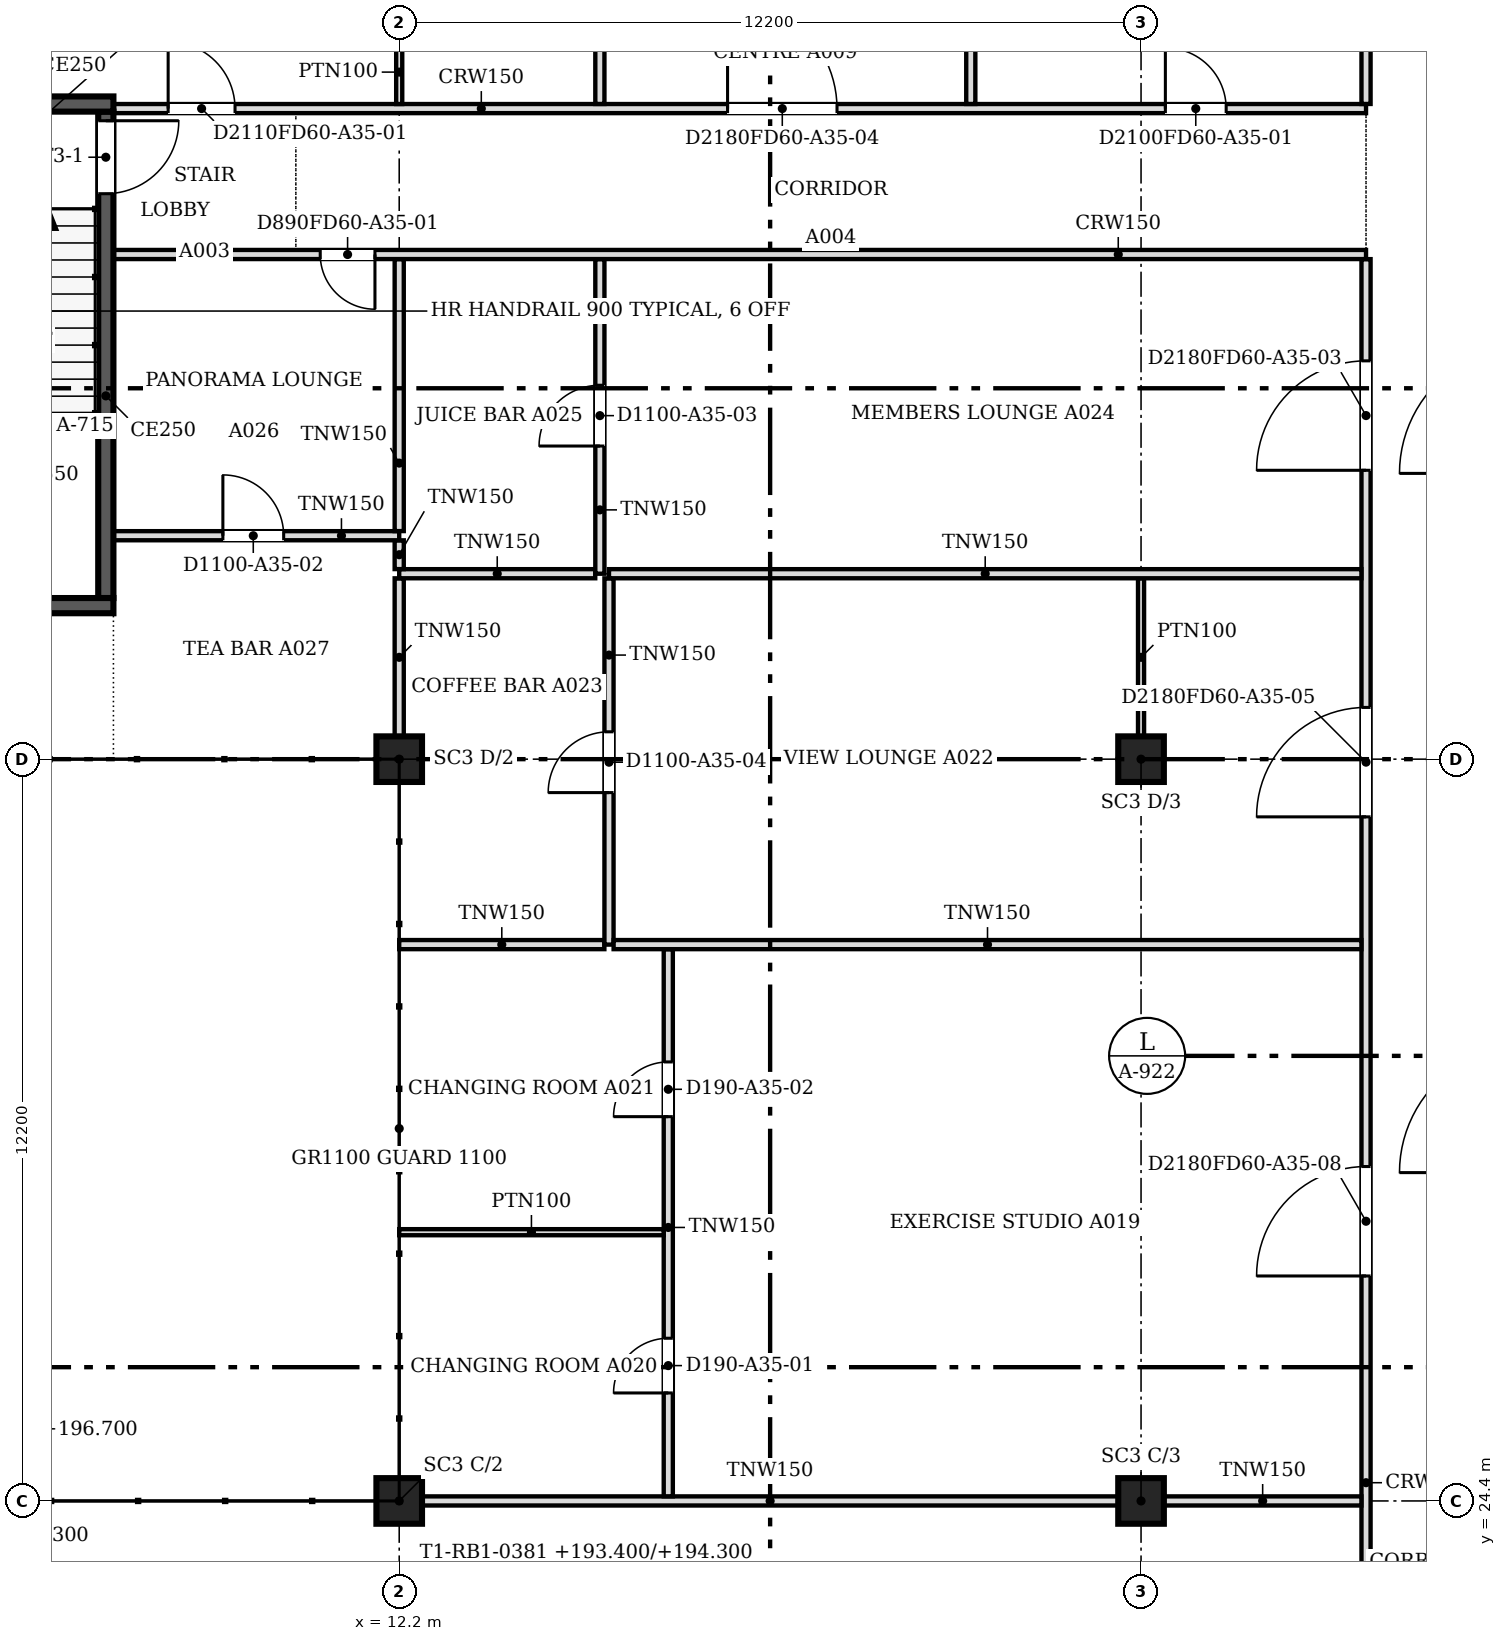
"""IFC4 building model, lengths in metres.
Left out: names, types, materials, properties, quantities, classifications, styles, units other than length and angle.
Written with IfcOpenShell. Run it as: python <this file> out.ifc"""

import sys

from ifc_helpers import new_model, si_unit, direction, frame, frame_2d, origin, origin_2d, place, context, subcontext, project, spatial, rectangle, extrude, source, transform, mapped, element, fill, save


model = new_model("IFC4")
c1 = context("Model", 3, precision=1e-05, world=origin(), true_north=direction((0.0, 1.0)))
c2 = subcontext(c1, "Body", "Model", "MODEL_VIEW")
j1 = project(units=[si_unit("LENGTHUNIT", "METRE"), si_unit("PLANEANGLEUNIT", "RADIAN")], contexts=[c1])
p1 = place(None, origin())
s1 = spatial("IfcSite", under=j1, at=p1, CompositionType="ELEMENT")
p2 = place(p1, origin())
s2 = spatial("IfcBuilding", under=s1, at=p2, CompositionType="ELEMENT")
p3 = place(p2, frame((0.0, 0.0, 193.4)))
s3 = spatial("IfcBuildingStorey", under=s2, at=p3, CompositionType="ELEMENT", Elevation=193.4)
for number, where, z_axis, x_axis in (
    (1, (12.2, 24.4, 0.0), (0.0, 0.0, 1.0), (1.0, 0.0, 0.0)),
    (2, (12.2, 36.6, 0.0), (0.0, 0.0, 1.0), (1.0, 0.0, 0.0)),
    (3, (24.4, 24.4, 0.0), (0.0, 0.0, 1.0), (1.0, 0.0, 0.0)),
    (4, (24.4, 36.6, 0.0), (0.0, 0.0, 1.0), (1.0, 0.0, 0.0)),
):
    element("IfcColumn", number, at=place(p3, frame(where, z_axis=z_axis, x_axis=x_axis)), inside=s3, PredefinedType="COLUMN", context=c2, shape_type="SweptSolid", body=[
        extrude(rectangle(XDim=0.75, YDim=0.75, at=origin_2d()), origin(), (0.0, 0.0, 1.0), 4.3),
    ])
for number, where, z_axis, x_axis in (
    (5, (7.5, 39.125, 0.0), (0.0, 0.0, 1.0), (-1.0, 0.0, 0.0)),
    (6, (3.6, 47.375, 0.0), (0.0, 0.0, 1.0), (1.0, 0.0, 0.0)),
):
    element("IfcWall", number, at=place(p3, frame(where, z_axis=z_axis, x_axis=x_axis)), inside=s3, PredefinedType="SOLIDWALL", context=c2, shape_type="SweptSolid", body=[
        extrude(rectangle(XDim=3.9, YDim=0.25, at=frame_2d((1.95, 0.0))), origin(), (0.0, 0.0, 1.0), 4.5),
    ])
p4 = place(p3, frame((7.375, 47.25, 0.0), z_axis=(0.0, 0.0, 1.0), x_axis=(0.0, -1.0, 0.0)))
e7 = element("IfcWall", 7, at=p4, inside=s3, PredefinedType="SOLIDWALL", context=c2, shape_type="SweptSolid", body=[
    extrude(rectangle(XDim=8.0, YDim=0.25, at=frame_2d((4.0, 0.0))), origin(), (0.0, 0.0, 1.0), 4.5),
])
m1 = source(origin(), c2, "Body", "SweptSolid", [
    extrude(rectangle(XDim=1.2, YDim=2.1, at=frame_2d((0.6, 1.05))), frame((0.0, 0.135, 0.0), z_axis=(0.0, -1.0, 0.0), x_axis=(1.0, 0.0, 0.0)), (0.0, 0.0, 1.0), 0.27),
])
p5 = place(p4, frame((0.15, 0.0, 0.0)))
e8 = element("IfcOpeningElement", 8, at=p5, cuts=e7, PredefinedType="OPENING", context=c2, shape_type="MappedRepresentation", body=[
    mapped(m1, transform((0.0, 0.0, 0.0), scale=1.0)),
])
p6 = place(p3, frame((28.1, 18.8, 0.0), z_axis=(0.0, 0.0, 1.0), x_axis=(0.0, 1.0, 0.0)))
e9 = element("IfcWall", 9, at=p6, inside=s3, PredefinedType="PARTITIONING", context=c2, shape_type="SweptSolid", body=[
    extrude(rectangle(XDim=26.024, YDim=0.15, at=frame_2d((13.012, 0.0))), origin(), (0.0, 0.0, 1.0), 3.767),
])
m2 = source(origin(), c2, "Body", "SweptSolid", [
    extrude(rectangle(XDim=1.8, YDim=2.1, at=frame_2d((0.9, 1.05))), frame((0.0, 0.085, 0.0), z_axis=(0.0, -1.0, 0.0), x_axis=(1.0, 0.0, 0.0)), (0.0, 0.0, 1.0), 0.17),
])
p7 = place(p6, frame((0.7, 0.0, 0.0)))
e10 = element("IfcOpeningElement", 10, at=p7, cuts=e9, PredefinedType="OPENING", context=c2, shape_type="MappedRepresentation", body=[
    mapped(m2, transform((0.0, 0.0, 0.0), scale=1.0)),
])
p8 = place(p6, frame((22.551, 0.0, 0.0)))
e11 = element("IfcOpeningElement", 11, at=p8, cuts=e9, PredefinedType="OPENING", context=c2, shape_type="MappedRepresentation", body=[
    mapped(m2, transform((0.0, 0.0, 0.0), scale=1.0)),
])
p9 = place(p6, frame((16.851, 0.0, 0.0)))
e12 = element("IfcOpeningElement", 12, at=p9, cuts=e9, PredefinedType="OPENING", context=c2, shape_type="MappedRepresentation", body=[
    mapped(m2, transform((0.0, 0.0, 0.0), scale=1.0)),
])
p10 = place(p6, frame((9.3, 0.0, 0.0)))
e13 = element("IfcOpeningElement", 13, at=p10, cuts=e9, PredefinedType="OPENING", context=c2, shape_type="MappedRepresentation", body=[
    mapped(m2, transform((0.0, 0.0, 0.0), scale=1.0)),
])
p11 = place(p3, frame((12.576, 24.4, 0.0), z_axis=(0.0, 0.0, 1.0), x_axis=(1.0, 0.0, 0.0)))
e14 = element("IfcWall", 14, at=p11, inside=s3, PredefinedType="PARTITIONING", context=c2, shape_type="SweptSolid", body=[
    extrude(rectangle(XDim=11.448, YDim=0.15, at=frame_2d((5.724, 0.0))), origin(), (0.0, 0.0, 1.0), 3.767),
])
p12 = place(p3, frame((24.776, 24.4, 0.0), z_axis=(0.0, 0.0, 1.0), x_axis=(1.0, 0.0, 0.0)))
e15 = element("IfcWall", 15, at=p12, inside=s3, PredefinedType="PARTITIONING", context=c2, shape_type="SweptSolid", body=[
    extrude(rectangle(XDim=3.248, YDim=0.15, at=frame_2d((1.624, 0.0))), origin(), (0.0, 0.0, 1.0), 3.767),
])
p13 = place(p3, frame((16.625, 24.476, 0.0), z_axis=(0.0, 0.0, 1.0), x_axis=(0.0, 1.0, 0.0)))
e16 = element("IfcWall", 16, at=p13, inside=s3, PredefinedType="PARTITIONING", context=c2, shape_type="SweptSolid", body=[
    extrude(rectangle(XDim=8.998, YDim=0.15, at=frame_2d((4.499, 0.0))), origin(), (0.0, 0.0, 1.0), 3.767),
])
m3 = source(origin(), c2, "Body", "SweptSolid", [
    extrude(rectangle(XDim=0.9, YDim=2.1, at=frame_2d((0.45, 1.05))), frame((0.0, 0.085, 0.0), z_axis=(0.0, -1.0, 0.0), x_axis=(1.0, 0.0, 0.0)), (0.0, 0.0, 1.0), 0.17),
])
p14 = place(p13, frame((1.7, 0.0, 0.0)))
e17 = element("IfcOpeningElement", 17, at=p14, cuts=e16, PredefinedType="OPENING", context=c2, shape_type="MappedRepresentation", body=[
    mapped(m3, transform((0.0, 0.0, 0.0), scale=1.0)),
])
p15 = place(p13, frame((6.244, 0.0, 0.0)))
e18 = element("IfcOpeningElement", 18, at=p15, cuts=e16, PredefinedType="OPENING", context=c2, shape_type="MappedRepresentation", body=[
    mapped(m3, transform((0.0, 0.0, 0.0), scale=1.0)),
])
p16 = place(p3, frame((12.2, 28.82, 0.0), z_axis=(0.0, 0.0, 1.0), x_axis=(1.0, 0.0, 0.0)))
e19 = element("IfcWall", 19, at=p16, inside=s3, PredefinedType="PARTITIONING", context=c2, shape_type="SweptSolid", body=[
    extrude(rectangle(XDim=4.349, YDim=0.1, at=frame_2d((2.175, 0.0))), origin(), (0.0, 0.0, 1.0), 3.767),
])
p17 = place(p3, frame((12.2, 33.55, 0.0), z_axis=(0.0, 0.0, 1.0), x_axis=(1.0, 0.0, 0.0)))
e20 = element("IfcWall", 20, at=p17, inside=s3, PredefinedType="PARTITIONING", context=c2, shape_type="SweptSolid", body=[
    extrude(rectangle(XDim=3.374, YDim=0.15, at=frame_2d((1.687, 0.0))), origin(), (0.0, 0.0, 1.0), 3.767),
])
p18 = place(p3, frame((15.65, 33.55, 0.0), z_axis=(0.0, 0.0, 1.0), x_axis=(0.0, 1.0, 0.0)))
e21 = element("IfcWall", 21, at=p18, inside=s3, PredefinedType="PARTITIONING", context=c2, shape_type="SweptSolid", body=[
    extrude(rectangle(XDim=6.024, YDim=0.15, at=frame_2d((3.012, 0.0))), origin(), (0.0, 0.0, 1.0), 3.767),
])
m4 = source(origin(), c2, "Body", "SweptSolid", [
    extrude(rectangle(XDim=1.0, YDim=2.1, at=frame_2d((0.5, 1.05))), frame((0.0, 0.085, 0.0), z_axis=(0.0, -1.0, 0.0), x_axis=(1.0, 0.0, 0.0)), (0.0, 0.0, 1.0), 0.17),
])
p19 = place(p18, frame((2.5, 0.0, 0.0)))
e22 = element("IfcOpeningElement", 22, at=p19, cuts=e21, PredefinedType="OPENING", context=c2, shape_type="MappedRepresentation", body=[
    mapped(m4, transform((0.0, 0.0, 0.0), scale=1.0)),
])
p20 = place(p3, frame((15.726, 33.55, 0.0), z_axis=(0.0, 0.0, 1.0), x_axis=(1.0, 0.0, 0.0)))
e23 = element("IfcWall", 23, at=p20, inside=s3, PredefinedType="PARTITIONING", context=c2, shape_type="SweptSolid", body=[
    extrude(rectangle(XDim=12.298, YDim=0.15, at=frame_2d((6.149, 0.0))), origin(), (0.0, 0.0, 1.0), 3.767),
])
p21 = place(p3, frame((12.2, 36.976, 0.0), z_axis=(0.0, 0.0, 1.0), x_axis=(0.0, 1.0, 0.0)))
e24 = element("IfcWall", 24, at=p21, inside=s3, PredefinedType="PARTITIONING", context=c2, shape_type="SweptSolid", body=[
    extrude(rectangle(XDim=2.598, YDim=0.15, at=frame_2d((1.299, 0.0))), origin(), (0.0, 0.0, 1.0), 3.767),
])
p22 = place(p3, frame((24.4, 36.975, 0.0), z_axis=(0.0, 0.0, 1.0), x_axis=(0.0, 1.0, 0.0)))
e25 = element("IfcWall", 25, at=p22, inside=s3, PredefinedType="PARTITIONING", context=c2, shape_type="SweptSolid", body=[
    extrude(rectangle(XDim=2.6, YDim=0.1, at=frame_2d((1.3, 0.0))), origin(), (0.0, 0.0, 1.0), 3.767),
])
p23 = place(p3, frame((12.2, 39.65, 0.0), z_axis=(0.0, 0.0, 1.0), x_axis=(1.0, 0.0, 0.0)))
e26 = element("IfcWall", 26, at=p23, inside=s3, PredefinedType="PARTITIONING", context=c2, shape_type="SweptSolid", body=[
    extrude(rectangle(XDim=3.224, YDim=0.15, at=frame_2d((1.612, 0.0))), origin(), (0.0, 0.0, 1.0), 3.767),
])
p24 = place(p3, frame((15.5, 39.65, 0.0), z_axis=(0.0, 0.0, 1.0), x_axis=(0.0, 1.0, 0.0)))
e27 = element("IfcWall", 27, at=p24, inside=s3, PredefinedType="PARTITIONING", context=c2, shape_type="SweptSolid", body=[
    extrude(rectangle(XDim=5.174, YDim=0.15, at=frame_2d((2.587, 0.0))), origin(), (0.0, 0.0, 1.0), 3.767),
])
p25 = place(p24, frame((2.1, 0.0, 0.0)))
e28 = element("IfcOpeningElement", 28, at=p25, cuts=e27, PredefinedType="OPENING", context=c2, shape_type="MappedRepresentation", body=[
    mapped(m4, transform((0.0, 0.0, 0.0), scale=1.0)),
])
p26 = place(p3, frame((15.65, 39.65, 0.0), z_axis=(0.0, 0.0, 1.0), x_axis=(1.0, 0.0, 0.0)))
e29 = element("IfcWall", 29, at=p26, inside=s3, PredefinedType="PARTITIONING", context=c2, shape_type="SweptSolid", body=[
    extrude(rectangle(XDim=12.374, YDim=0.15, at=frame_2d((6.187, 0.0))), origin(), (0.0, 0.0, 1.0), 3.767),
])
p27 = place(p3, frame((12.2, 39.726, 0.0), z_axis=(0.0, 0.0, 1.0), x_axis=(0.0, 1.0, 0.0)))
e30 = element("IfcWall", 30, at=p27, inside=s3, PredefinedType="PARTITIONING", context=c2, shape_type="SweptSolid", body=[
    extrude(rectangle(XDim=0.473, YDim=0.15, at=frame_2d((0.236, 0.0))), origin(), (0.0, 0.0, 1.0), 3.767),
])
p28 = place(p3, frame((12.2, 40.275, 0.0), z_axis=(0.0, 0.0, 1.0), x_axis=(-1.0, 0.0, 0.0)))
e31 = element("IfcWall", 31, at=p28, inside=s3, PredefinedType="PARTITIONING", context=c2, shape_type="SweptSolid", body=[
    extrude(rectangle(XDim=4.7, YDim=0.15, at=frame_2d((2.35, 0.0))), origin(), (0.0, 0.0, 1.0), 3.767),
])
p29 = place(p28, frame((1.9, 0.0, 0.0)))
e32 = element("IfcOpeningElement", 32, at=p29, cuts=e31, PredefinedType="OPENING", context=c2, shape_type="MappedRepresentation", body=[
    mapped(m4, transform((0.0, 0.0, 0.0), scale=1.0)),
])
p30 = place(p3, frame((12.2, 40.351, 0.0), z_axis=(0.0, 0.0, 1.0), x_axis=(0.0, 1.0, 0.0)))
e33 = element("IfcWall", 33, at=p30, inside=s3, PredefinedType="PARTITIONING", context=c2, shape_type="SweptSolid", body=[
    extrude(rectangle(XDim=4.473, YDim=0.15, at=frame_2d((2.236, 0.0))), origin(), (0.0, 0.0, 1.0), 3.767),
])
p31 = place(p3, frame((28.1, 44.9, 0.0), z_axis=(0.0, 0.0, 1.0), x_axis=(-1.0, 0.0, 0.0)))
e34 = element("IfcWall", 34, at=p31, inside=s3, PredefinedType="PARTITIONING", context=c2, shape_type="SweptSolid", body=[
    extrude(rectangle(XDim=20.6, YDim=0.15, at=frame_2d((10.3, 0.0))), origin(), (0.0, 0.0, 1.0), 3.767),
])
p32 = place(p31, frame((16.299, 0.0, 0.0)))
e35 = element("IfcOpeningElement", 35, at=p32, cuts=e34, PredefinedType="OPENING", context=c2, shape_type="MappedRepresentation", body=[
    mapped(m3, transform((0.0, 0.0, 0.0), scale=1.0)),
])
p33 = place(p3, frame((7.5, 47.3, 0.0), z_axis=(0.0, 0.0, 1.0), x_axis=(1.0, 0.0, 0.0)))
e36 = element("IfcWall", 36, at=p33, inside=s3, PredefinedType="PARTITIONING", context=c2, shape_type="SweptSolid", body=[
    extrude(rectangle(XDim=20.6, YDim=0.15, at=frame_2d((10.3, 0.0))), origin(), (0.0, 0.0, 1.0), 3.767),
])
m5 = source(origin(), c2, "Body", "SweptSolid", [
    extrude(rectangle(XDim=1.1, YDim=2.1, at=frame_2d((0.55, 1.05))), frame((0.0, 0.085, 0.0), z_axis=(0.0, -1.0, 0.0), x_axis=(1.0, 0.0, 0.0)), (0.0, 0.0, 1.0), 0.17),
])
p34 = place(p33, frame((0.9, 0.0, 0.0)))
e37 = element("IfcOpeningElement", 37, at=p34, cuts=e36, PredefinedType="OPENING", context=c2, shape_type="MappedRepresentation", body=[
    mapped(m5, transform((0.0, 0.0, 0.0), scale=1.0)),
])
p35 = place(p33, frame((10.1, 0.0, 0.0)))
e38 = element("IfcOpeningElement", 38, at=p35, cuts=e36, PredefinedType="OPENING", context=c2, shape_type="MappedRepresentation", body=[
    mapped(m2, transform((0.0, 0.0, 0.0), scale=1.0)),
])
p36 = place(p33, frame((17.3, 0.0, 0.0)))
e39 = element("IfcOpeningElement", 39, at=p36, cuts=e36, PredefinedType="OPENING", context=c2, shape_type="MappedRepresentation", body=[
    mapped(m4, transform((0.0, 0.0, 0.0), scale=1.0)),
])
for number, where, z_axis, x_axis in (
    (40, (15.5, 47.376, 0.0), (0.0, 0.0, 1.0), (0.0, 1.0, 0.0)),
    (41, (21.6, 47.376, 0.0), (0.0, 0.0, 1.0), (0.0, 1.0, 0.0)),
):
    element("IfcWall", number, at=place(p3, frame(where, z_axis=z_axis, x_axis=x_axis)), inside=s3, PredefinedType="PARTITIONING", context=c2, shape_type="SweptSolid", body=[
        extrude(rectangle(XDim=2.898, YDim=0.15, at=frame_2d((1.449, 0.0))), origin(), (0.0, 0.0, 1.0), 3.767),
    ])
p37 = place(p3, frame((28.1, 47.376, 0.0), z_axis=(0.0, 0.0, 1.0), x_axis=(0.0, 1.0, 0.0)))
e42 = element("IfcWall", 42, at=p37, inside=s3, PredefinedType="PARTITIONING", context=c2, shape_type="SweptSolid", body=[
    extrude(rectangle(XDim=3.748, YDim=0.15, at=frame_2d((1.874, 0.0))), origin(), (0.0, 0.0, 1.0), 3.767),
])
p38 = place(p3, frame((12.2, 48.425, 0.0), z_axis=(0.0, 0.0, 1.0), x_axis=(0.0, -1.0, 0.0)))
e43 = element("IfcWall", 43, at=p38, inside=s3, PredefinedType="PARTITIONING", context=c2, shape_type="SweptSolid", body=[
    extrude(rectangle(XDim=1.05, YDim=0.1, at=frame_2d((0.525, 0.0))), origin(), (0.0, 0.0, 1.0), 3.767),
])
m6 = source(origin(), c2, "Body", "SweptSolid", [
    extrude(rectangle(XDim=1.2, YDim=2.1, at=frame_2d((0.6, 1.05))), frame((0.0, 0.025, 0.0), z_axis=(0.0, -1.0, 0.0), x_axis=(1.0, 0.0, 0.0)), (0.0, 0.0, 1.0), 0.05),
])
p39 = place(p5, origin())
e44 = element("IfcDoor", 44, at=p39, inside=s3, OperationType="SINGLE_SWING_LEFT", PredefinedType="DOOR", context=c2, shape_type="MappedRepresentation", body=[
    mapped(m6, transform((0.0, 0.0, 0.0), scale=1.0)),
])
fill(e8, e44)
m7 = source(origin(), c2, "Body", "SweptSolid", [
    extrude(rectangle(XDim=0.9, YDim=2.1, at=frame_2d((0.45, 1.05))), frame((0.0, 0.025, 0.0), z_axis=(0.0, -1.0, 0.0), x_axis=(1.0, 0.0, 0.0)), (0.0, 0.0, 1.0), 0.05),
])
p40 = place(p32, origin())
e45 = element("IfcDoor", 45, at=p40, inside=s3, OperationType="SINGLE_SWING_LEFT", PredefinedType="DOOR", context=c2, shape_type="MappedRepresentation", body=[
    mapped(m7, transform((0.0, 0.0, 0.0), scale=1.0)),
])
fill(e35, e45)
m8 = source(origin(), c2, "Body", "SweptSolid", [
    extrude(rectangle(XDim=1.1, YDim=2.1, at=frame_2d((0.55, 1.05))), frame((0.0, 0.025, 0.0), z_axis=(0.0, -1.0, 0.0), x_axis=(1.0, 0.0, 0.0)), (0.0, 0.0, 1.0), 0.05),
])
p41 = place(p34, origin())
e46 = element("IfcDoor", 46, at=p41, inside=s3, OperationType="SINGLE_SWING_LEFT", PredefinedType="DOOR", context=c2, shape_type="MappedRepresentation", body=[
    mapped(m8, transform((0.0, 0.0, 0.0), scale=1.0)),
])
fill(e37, e46)
p42 = place(p14, origin())
e47 = element("IfcDoor", 47, at=p42, inside=s3, OperationType="SINGLE_SWING_LEFT", PredefinedType="DOOR", context=c2, shape_type="MappedRepresentation", body=[
    mapped(m7, transform((0.0, 0.0, 0.0), scale=1.0)),
])
fill(e17, e47)
p43 = place(p15, origin())
e48 = element("IfcDoor", 48, at=p43, inside=s3, OperationType="SINGLE_SWING_LEFT", PredefinedType="DOOR", context=c2, shape_type="MappedRepresentation", body=[
    mapped(m7, transform((0.0, 0.0, 0.0), scale=1.0)),
])
fill(e18, e48)
m9 = source(origin(), c2, "Body", "SweptSolid", [
    extrude(rectangle(XDim=1.0, YDim=2.1, at=frame_2d((0.5, 1.05))), frame((0.0, 0.025, 0.0), z_axis=(0.0, -1.0, 0.0), x_axis=(1.0, 0.0, 0.0)), (0.0, 0.0, 1.0), 0.05),
])
p44 = place(p29, origin())
e49 = element("IfcDoor", 49, at=p44, inside=s3, OperationType="SINGLE_SWING_RIGHT", PredefinedType="DOOR", context=c2, shape_type="MappedRepresentation", body=[
    mapped(m9, transform((0.0, 0.0, 0.0), scale=1.0)),
])
fill(e32, e49)
m10 = source(origin(), c2, "Body", "SweptSolid", [
    extrude(rectangle(XDim=1.8, YDim=2.1, at=frame_2d((0.9, 1.05))), frame((0.0, 0.025, 0.0), z_axis=(0.0, -1.0, 0.0), x_axis=(1.0, 0.0, 0.0)), (0.0, 0.0, 1.0), 0.05),
])
p45 = place(p8, origin())
e50 = element("IfcDoor", 50, at=p45, inside=s3, OperationType="DOUBLE_DOOR_SINGLE_SWING", PredefinedType="DOOR", context=c2, shape_type="MappedRepresentation", body=[
    mapped(m10, transform((0.0, 0.0, 0.0), scale=1.0)),
])
fill(e11, e50)
p46 = place(p25, origin())
e51 = element("IfcDoor", 51, at=p46, inside=s3, OperationType="SINGLE_SWING_LEFT", PredefinedType="DOOR", context=c2, shape_type="MappedRepresentation", body=[
    mapped(m9, transform((0.0, 0.0, 0.0), scale=1.0)),
])
fill(e28, e51)
p47 = place(p19, origin())
e52 = element("IfcDoor", 52, at=p47, inside=s3, OperationType="SINGLE_SWING_LEFT", PredefinedType="DOOR", context=c2, shape_type="MappedRepresentation", body=[
    mapped(m9, transform((0.0, 0.0, 0.0), scale=1.0)),
])
fill(e22, e52)
p48 = place(p35, origin())
e53 = element("IfcDoor", 53, at=p48, inside=s3, OperationType="DOUBLE_DOOR_SINGLE_SWING", PredefinedType="DOOR", context=c2, shape_type="MappedRepresentation", body=[
    mapped(m10, transform((0.0, 0.0, 0.0), scale=1.0)),
])
fill(e38, e53)
p49 = place(p9, origin())
e54 = element("IfcDoor", 54, at=p49, inside=s3, OperationType="DOUBLE_DOOR_SINGLE_SWING", PredefinedType="DOOR", context=c2, shape_type="MappedRepresentation", body=[
    mapped(m10, transform((0.0, 0.0, 0.0), scale=1.0)),
])
fill(e12, e54)
p50 = place(p36, origin())
e55 = element("IfcDoor", 55, at=p50, inside=s3, OperationType="SINGLE_SWING_LEFT", PredefinedType="DOOR", context=c2, shape_type="MappedRepresentation", body=[
    mapped(m9, transform((0.0, 0.0, 0.0), scale=1.0)),
])
fill(e39, e55)
p51 = place(p10, origin())
e56 = element("IfcDoor", 56, at=p51, inside=s3, OperationType="DOUBLE_DOOR_SINGLE_SWING", PredefinedType="DOOR", context=c2, shape_type="MappedRepresentation", body=[
    mapped(m10, transform((0.0, 0.0, 0.0), scale=1.0)),
])
fill(e13, e56)
save(model, sys.argv[1])
